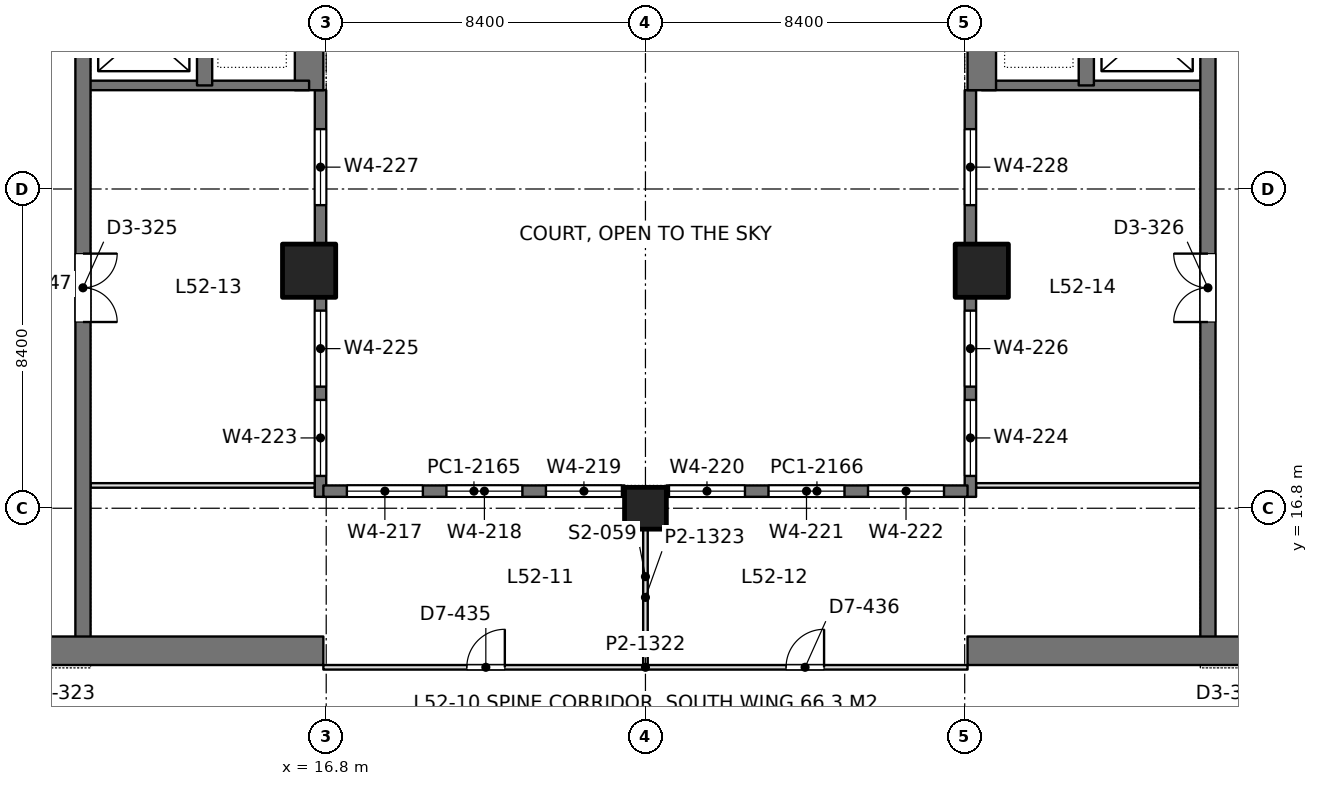
"""IFC4 building model, lengths in metres.
Left out: names, types, materials, properties, quantities, classifications, styles, units other than length and angle.
Written with IfcOpenShell. Run it as: python <this file> out.ifc"""

import sys

from ifc_helpers import new_model, si_unit, direction, frame, frame_2d, origin, origin_2d, place, context, subcontext, project, spatial, rectangle, extrude, element, fill, save


model = new_model("IFC4")
c1 = context("Model", 3, precision=1e-05, world=origin(), true_north=direction((0.0, 1.0)))
c2 = subcontext(c1, "Body", "Model", "MODEL_VIEW")
j1 = project(units=[si_unit("LENGTHUNIT", "METRE"), si_unit("PLANEANGLEUNIT", "RADIAN")], contexts=[c1])
p1 = place(None, origin())
s1 = spatial("IfcSite", under=j1, at=p1, CompositionType="ELEMENT")
p2 = place(p1, origin())
s2 = spatial("IfcBuilding", under=s1, at=p2, CompositionType="ELEMENT")
p3 = place(p2, frame((0.0, 0.0, 228.0)))
s3 = spatial("IfcBuildingStorey", under=s2, at=p3, CompositionType="ELEMENT", Elevation=228.0)
p4 = place(p3, frame((25.2, 16.8, 0.0), z_axis=(0.0, 0.0, 1.0), x_axis=(1.0, 0.0, 0.0)))
e1 = element("IfcColumn", 1, at=p4, inside=s3, PredefinedType="COLUMN", context=c2, shape_type="SweptSolid", body=[
    extrude(rectangle(XDim=1.1, YDim=1.1, at=origin_2d()), origin(), (0.0, 0.0, 1.0), 4.2),
])
for number, where, z_axis, x_axis in (
    (2, (16.35, 23.05, 0.0), (0.0, 0.0, 1.0), (1.0, 0.0, 0.0)),
    (3, (34.05, 23.05, 0.0), (0.0, 0.0, 1.0), (1.0, 0.0, 0.0)),
):
    element("IfcColumn", number, at=place(p3, frame(where, z_axis=z_axis, x_axis=x_axis)), inside=s3, PredefinedType="COLUMN", context=c2, shape_type="SweptSolid", body=[
        extrude(rectangle(XDim=1.4, YDim=1.4, at=origin_2d()), origin(), (0.0, 0.0, 1.0), 4.2),
    ])
p5 = place(p3, frame((-1.125, 13.05, 0.0), z_axis=(0.0, 0.0, 1.0), x_axis=(1.0, 0.0, 0.0)))
e4 = element("IfcWall", 4, at=p5, inside=s3, PredefinedType="SHEAR", context=c2, shape_type="SweptSolid", body=[
    extrude(rectangle(XDim=17.85, YDim=0.75, at=frame_2d((8.925, 0.0))), origin(), (0.0, 0.0, 1.0), 4.2),
])
p6 = place(p5, frame((8.875, 0.0, 0.0)))
e5 = element("IfcOpeningElement", 5, at=p6, cuts=e4, PredefinedType="OPENING", context=c2, shape_type="SweptSolid", body=[
    extrude(rectangle(XDim=1.8, YDim=2.4, at=frame_2d((0.9, 1.2))), frame((0.0, 0.385, 0.0), z_axis=(0.0, -1.0, 0.0), x_axis=(1.0, 0.0, 0.0)), (0.0, 0.0, 1.0), 0.77),
])
p7 = place(p3, frame((16.35, 27.8, 0.0), z_axis=(0.0, 0.0, 1.0), x_axis=(0.0, 1.0, 0.0)))
e6 = element("IfcWall", 6, at=p7, inside=s3, PredefinedType="SHEAR", context=c2, shape_type="SweptSolid", body=[
    extrude(rectangle(XDim=9.55, YDim=0.75, at=frame_2d((4.775, 0.0))), origin(), (0.0, 0.0, 1.0), 4.2),
])
p8 = place(p3, frame((10.4, 13.05, 0.0), z_axis=(0.0, 0.0, 1.0), x_axis=(0.0, 1.0, 0.0)))
e7 = element("IfcWall", 7, at=p8, inside=s3, PredefinedType="SHEAR", context=c2, shape_type="SweptSolid", body=[
    extrude(rectangle(XDim=24.3, YDim=0.4, at=frame_2d((12.15, 0.0))), origin(), (0.0, 0.0, 1.0), 4.2),
])
p9 = place(p8, frame((15.75, 0.0, 0.0)))
e8 = element("IfcOpeningElement", 8, at=p9, cuts=e7, PredefinedType="OPENING", context=c2, shape_type="SweptSolid", body=[
    extrude(rectangle(XDim=1.1, YDim=2.2, at=frame_2d((0.55, 1.1))), frame((0.0, 0.21, 0.0), z_axis=(0.0, -1.0, 0.0), x_axis=(1.0, 0.0, 0.0)), (0.0, 0.0, 1.0), 0.42),
])
p10 = place(p8, frame((18.6, 0.0, 0.0)))
e9 = element("IfcOpeningElement", 9, at=p10, cuts=e7, PredefinedType="OPENING", context=c2, shape_type="SweptSolid", body=[
    extrude(rectangle(XDim=1.1, YDim=2.2, at=frame_2d((0.55, 1.1))), frame((0.0, 0.21, 0.0), z_axis=(0.0, -1.0, 0.0), x_axis=(1.0, 0.0, 0.0)), (0.0, 0.0, 1.0), 0.42),
])
p11 = place(p8, frame((21.45, 0.0, 0.0)))
e10 = element("IfcOpeningElement", 10, at=p11, cuts=e7, PredefinedType="OPENING", context=c2, shape_type="SweptSolid", body=[
    extrude(rectangle(XDim=1.1, YDim=2.2, at=frame_2d((0.55, 1.1))), frame((0.0, 0.21, 0.0), z_axis=(0.0, -1.0, 0.0), x_axis=(1.0, 0.0, 0.0)), (0.0, 0.0, 1.0), 0.42),
])
p12 = place(p8, frame((8.65, 0.0, 0.0)))
e11 = element("IfcOpeningElement", 11, at=p12, cuts=e7, PredefinedType="OPENING", context=c2, shape_type="SweptSolid", body=[
    extrude(rectangle(XDim=1.8, YDim=2.4, at=frame_2d((0.9, 1.2))), frame((0.0, 0.21, 0.0), z_axis=(0.0, -1.0, 0.0), x_axis=(1.0, 0.0, 0.0)), (0.0, 0.0, 1.0), 0.42),
])
p13 = place(p3, frame((13.6, 27.925, 0.0), z_axis=(0.0, 0.0, 1.0), x_axis=(0.0, 1.0, 0.0)))
e12 = element("IfcWall", 12, at=p13, inside=s3, PredefinedType="SHEAR", context=c2, shape_type="SweptSolid", body=[
    extrude(rectangle(XDim=9.425, YDim=0.4, at=frame_2d((4.712, 0.0))), origin(), (0.0, 0.0, 1.0), 4.2),
])
p14 = place(p3, frame((10.4, 27.925, 0.0), z_axis=(0.0, 0.0, 1.0), x_axis=(1.0, 0.0, 0.0)))
e13 = element("IfcWall", 13, at=p14, inside=s3, PredefinedType="SHEAR", context=c2, shape_type="SweptSolid", body=[
    extrude(rectangle(XDim=5.95, YDim=0.25, at=frame_2d((2.975, 0.0))), origin(), (0.0, 0.0, 1.0), 4.2),
])
p15 = place(p3, frame((33.675, 13.05, 0.0), z_axis=(0.0, 0.0, 1.0), x_axis=(1.0, 0.0, 0.0)))
e14 = element("IfcWall", 14, at=p15, inside=s3, PredefinedType="SHEAR", context=c2, shape_type="SweptSolid", body=[
    extrude(rectangle(XDim=17.85, YDim=0.75, at=frame_2d((8.925, 0.0))), origin(), (0.0, 0.0, 1.0), 4.2),
])
p16 = place(p15, frame((7.175, 0.0, 0.0)))
e15 = element("IfcOpeningElement", 15, at=p16, cuts=e14, PredefinedType="OPENING", context=c2, shape_type="SweptSolid", body=[
    extrude(rectangle(XDim=1.8, YDim=2.4, at=frame_2d((0.9, 1.2))), frame((0.0, 0.385, 0.0), z_axis=(0.0, -1.0, 0.0), x_axis=(1.0, 0.0, 0.0)), (0.0, 0.0, 1.0), 0.77),
])
p17 = place(p3, frame((34.05, 27.8, 0.0), z_axis=(0.0, 0.0, 1.0), x_axis=(0.0, 1.0, 0.0)))
e16 = element("IfcWall", 16, at=p17, inside=s3, PredefinedType="SHEAR", context=c2, shape_type="SweptSolid", body=[
    extrude(rectangle(XDim=9.55, YDim=0.75, at=frame_2d((4.775, 0.0))), origin(), (0.0, 0.0, 1.0), 4.2),
])
p18 = place(p3, frame((40.0, 13.05, 0.0), z_axis=(0.0, 0.0, 1.0), x_axis=(0.0, 1.0, 0.0)))
e17 = element("IfcWall", 17, at=p18, inside=s3, PredefinedType="SHEAR", context=c2, shape_type="SweptSolid", body=[
    extrude(rectangle(XDim=24.3, YDim=0.4, at=frame_2d((12.15, 0.0))), origin(), (0.0, 0.0, 1.0), 4.2),
])
p19 = place(p18, frame((15.75, 0.0, 0.0)))
e18 = element("IfcOpeningElement", 18, at=p19, cuts=e17, PredefinedType="OPENING", context=c2, shape_type="SweptSolid", body=[
    extrude(rectangle(XDim=1.1, YDim=2.2, at=frame_2d((0.55, 1.1))), frame((0.0, 0.21, 0.0), z_axis=(0.0, -1.0, 0.0), x_axis=(1.0, 0.0, 0.0)), (0.0, 0.0, 1.0), 0.42),
])
p20 = place(p18, frame((18.6, 0.0, 0.0)))
e19 = element("IfcOpeningElement", 19, at=p20, cuts=e17, PredefinedType="OPENING", context=c2, shape_type="SweptSolid", body=[
    extrude(rectangle(XDim=1.1, YDim=2.2, at=frame_2d((0.55, 1.1))), frame((0.0, 0.21, 0.0), z_axis=(0.0, -1.0, 0.0), x_axis=(1.0, 0.0, 0.0)), (0.0, 0.0, 1.0), 0.42),
])
p21 = place(p18, frame((21.45, 0.0, 0.0)))
e20 = element("IfcOpeningElement", 20, at=p21, cuts=e17, PredefinedType="OPENING", context=c2, shape_type="SweptSolid", body=[
    extrude(rectangle(XDim=1.1, YDim=2.2, at=frame_2d((0.55, 1.1))), frame((0.0, 0.21, 0.0), z_axis=(0.0, -1.0, 0.0), x_axis=(1.0, 0.0, 0.0)), (0.0, 0.0, 1.0), 0.42),
])
p22 = place(p18, frame((8.65, 0.0, 0.0)))
e21 = element("IfcOpeningElement", 21, at=p22, cuts=e17, PredefinedType="OPENING", context=c2, shape_type="SweptSolid", body=[
    extrude(rectangle(XDim=1.8, YDim=2.4, at=frame_2d((0.9, 1.2))), frame((0.0, 0.21, 0.0), z_axis=(0.0, -1.0, 0.0), x_axis=(1.0, 0.0, 0.0)), (0.0, 0.0, 1.0), 0.42),
])
p23 = place(p3, frame((36.8, 27.925, 0.0), z_axis=(0.0, 0.0, 1.0), x_axis=(0.0, 1.0, 0.0)))
e22 = element("IfcWall", 22, at=p23, inside=s3, PredefinedType="SHEAR", context=c2, shape_type="SweptSolid", body=[
    extrude(rectangle(XDim=9.425, YDim=0.4, at=frame_2d((4.712, 0.0))), origin(), (0.0, 0.0, 1.0), 4.2),
])
p24 = place(p3, frame((40.0, 27.925, 0.0), z_axis=(0.0, 0.0, 1.0), x_axis=(-1.0, 0.0, 0.0)))
e23 = element("IfcWall", 23, at=p24, inside=s3, PredefinedType="SHEAR", context=c2, shape_type="SweptSolid", body=[
    extrude(rectangle(XDim=5.95, YDim=0.25, at=frame_2d((2.975, 0.0))), origin(), (0.0, 0.0, 1.0), 4.2),
])
p25 = place(p3, frame((16.65, 17.1, 0.0), z_axis=(0.0, 0.0, 1.0), x_axis=(0.0, 1.0, 0.0)))
e24 = element("IfcWall", 24, at=p25, inside=s3, PredefinedType="SOLIDWALL", context=c2, shape_type="SweptSolid", body=[
    extrude(rectangle(XDim=10.7, YDim=0.3, at=frame_2d((5.35, 0.0))), origin(), (0.0, 0.0, 1.0), 4.05),
])
p26 = place(p25, frame((0.55, 0.0, 0.9)))
e25 = element("IfcOpeningElement", 25, at=p26, cuts=e24, PredefinedType="OPENING", context=c2, shape_type="SweptSolid", body=[
    extrude(rectangle(XDim=2.0, YDim=1.9, at=frame_2d((1.0, 0.95))), frame((0.0, 0.16, 0.0), z_axis=(0.0, -1.0, 0.0), x_axis=(1.0, 0.0, 0.0)), (0.0, 0.0, 1.0), 0.32),
])
p27 = place(p25, frame((2.9, 0.0, 0.9)))
e26 = element("IfcOpeningElement", 26, at=p27, cuts=e24, PredefinedType="OPENING", context=c2, shape_type="SweptSolid", body=[
    extrude(rectangle(XDim=2.0, YDim=1.9, at=frame_2d((1.0, 0.95))), frame((0.0, 0.16, 0.0), z_axis=(0.0, -1.0, 0.0), x_axis=(1.0, 0.0, 0.0)), (0.0, 0.0, 1.0), 0.32),
])
p28 = place(p25, frame((7.675, 0.0, 0.9)))
e27 = element("IfcOpeningElement", 27, at=p28, cuts=e24, PredefinedType="OPENING", context=c2, shape_type="SweptSolid", body=[
    extrude(rectangle(XDim=2.0, YDim=1.9, at=frame_2d((1.0, 0.95))), frame((0.0, 0.16, 0.0), z_axis=(0.0, -1.0, 0.0), x_axis=(1.0, 0.0, 0.0)), (0.0, 0.0, 1.0), 0.32),
])
p29 = place(p3, frame((33.75, 17.1, 0.0), z_axis=(0.0, 0.0, 1.0), x_axis=(0.0, 1.0, 0.0)))
e28 = element("IfcWall", 28, at=p29, inside=s3, PredefinedType="SOLIDWALL", context=c2, shape_type="SweptSolid", body=[
    extrude(rectangle(XDim=10.7, YDim=0.3, at=frame_2d((5.35, 0.0))), origin(), (0.0, 0.0, 1.0), 4.05),
])
p30 = place(p29, frame((0.55, 0.0, 0.9)))
e29 = element("IfcOpeningElement", 29, at=p30, cuts=e28, PredefinedType="OPENING", context=c2, shape_type="SweptSolid", body=[
    extrude(rectangle(XDim=2.0, YDim=1.9, at=frame_2d((1.0, 0.95))), frame((0.0, 0.16, 0.0), z_axis=(0.0, -1.0, 0.0), x_axis=(1.0, 0.0, 0.0)), (0.0, 0.0, 1.0), 0.32),
])
p31 = place(p29, frame((2.9, 0.0, 0.9)))
e30 = element("IfcOpeningElement", 30, at=p31, cuts=e28, PredefinedType="OPENING", context=c2, shape_type="SweptSolid", body=[
    extrude(rectangle(XDim=2.0, YDim=1.9, at=frame_2d((1.0, 0.95))), frame((0.0, 0.16, 0.0), z_axis=(0.0, -1.0, 0.0), x_axis=(1.0, 0.0, 0.0)), (0.0, 0.0, 1.0), 0.32),
])
p32 = place(p29, frame((7.675, 0.0, 0.9)))
e31 = element("IfcOpeningElement", 31, at=p32, cuts=e28, PredefinedType="OPENING", context=c2, shape_type="SweptSolid", body=[
    extrude(rectangle(XDim=2.0, YDim=1.9, at=frame_2d((1.0, 0.95))), frame((0.0, 0.16, 0.0), z_axis=(0.0, -1.0, 0.0), x_axis=(1.0, 0.0, 0.0)), (0.0, 0.0, 1.0), 0.32),
])
p33 = place(p3, frame((16.725, 17.25, 0.0), z_axis=(0.0, 0.0, 1.0), x_axis=(1.0, 0.0, 0.0)))
e32 = element("IfcWall", 32, at=p33, inside=s3, PredefinedType="SOLIDWALL", context=c2, shape_type="SweptSolid", body=[
    extrude(rectangle(XDim=7.925, YDim=0.3, at=frame_2d((3.962, 0.0))), origin(), (0.0, 0.0, 1.0), 4.05),
])
p34 = place(p33, frame((0.619, 0.0, 0.9)))
e33 = element("IfcOpeningElement", 33, at=p34, cuts=e32, PredefinedType="OPENING", context=c2, shape_type="SweptSolid", body=[
    extrude(rectangle(XDim=2.0, YDim=1.9, at=frame_2d((1.0, 0.95))), frame((0.0, 0.16, 0.0), z_axis=(0.0, -1.0, 0.0), x_axis=(1.0, 0.0, 0.0)), (0.0, 0.0, 1.0), 0.32),
])
p35 = place(p33, frame((3.238, 0.0, 0.9)))
e34 = element("IfcOpeningElement", 34, at=p35, cuts=e32, PredefinedType="OPENING", context=c2, shape_type="SweptSolid", body=[
    extrude(rectangle(XDim=2.0, YDim=1.9, at=frame_2d((1.0, 0.95))), frame((0.0, 0.16, 0.0), z_axis=(0.0, -1.0, 0.0), x_axis=(1.0, 0.0, 0.0)), (0.0, 0.0, 1.0), 0.32),
])
p36 = place(p33, frame((5.856, 0.0, 0.9)))
e35 = element("IfcOpeningElement", 35, at=p36, cuts=e32, PredefinedType="OPENING", context=c2, shape_type="SweptSolid", body=[
    extrude(rectangle(XDim=2.0, YDim=1.9, at=frame_2d((1.0, 0.95))), frame((0.0, 0.16, 0.0), z_axis=(0.0, -1.0, 0.0), x_axis=(1.0, 0.0, 0.0)), (0.0, 0.0, 1.0), 0.32),
])
p37 = place(p3, frame((25.75, 17.25, 0.0), z_axis=(0.0, 0.0, 1.0), x_axis=(1.0, 0.0, 0.0)))
e36 = element("IfcWall", 36, at=p37, inside=s3, PredefinedType="SOLIDWALL", context=c2, shape_type="SweptSolid", body=[
    extrude(rectangle(XDim=7.925, YDim=0.3, at=frame_2d((3.962, 0.0))), origin(), (0.0, 0.0, 1.0), 4.05),
])
p38 = place(p37, frame((0.069, 0.0, 0.9)))
e37 = element("IfcOpeningElement", 37, at=p38, cuts=e36, PredefinedType="OPENING", context=c2, shape_type="SweptSolid", body=[
    extrude(rectangle(XDim=2.0, YDim=1.9, at=frame_2d((1.0, 0.95))), frame((0.0, 0.16, 0.0), z_axis=(0.0, -1.0, 0.0), x_axis=(1.0, 0.0, 0.0)), (0.0, 0.0, 1.0), 0.32),
])
p39 = place(p37, frame((2.688, 0.0, 0.9)))
e38 = element("IfcOpeningElement", 38, at=p39, cuts=e36, PredefinedType="OPENING", context=c2, shape_type="SweptSolid", body=[
    extrude(rectangle(XDim=2.0, YDim=1.9, at=frame_2d((1.0, 0.95))), frame((0.0, 0.16, 0.0), z_axis=(0.0, -1.0, 0.0), x_axis=(1.0, 0.0, 0.0)), (0.0, 0.0, 1.0), 0.32),
])
p40 = place(p37, frame((5.306, 0.0, 0.9)))
e39 = element("IfcOpeningElement", 39, at=p40, cuts=e36, PredefinedType="OPENING", context=c2, shape_type="SweptSolid", body=[
    extrude(rectangle(XDim=2.0, YDim=1.9, at=frame_2d((1.0, 0.95))), frame((0.0, 0.16, 0.0), z_axis=(0.0, -1.0, 0.0), x_axis=(1.0, 0.0, 0.0)), (0.0, 0.0, 1.0), 0.32),
])
for number, where, z_axis, x_axis in (
    (40, (10.598, 17.4, 0.0), (0.0, 0.0, 1.0), (1.0, 0.0, 0.0)),
    (41, (33.898, 17.4, 0.0), (0.0, 0.0, 1.0), (1.0, 0.0, 0.0)),
):
    element("IfcWall", number, at=place(p3, frame(where, z_axis=z_axis, x_axis=x_axis)), inside=s3, PredefinedType="PARTITIONING", context=c2, shape_type="SweptSolid", body=[
        extrude(rectangle(XDim=5.904, YDim=0.12, at=frame_2d((2.952, 0.0))), origin(), (0.0, 0.0, 1.0), 3.55),
    ])
p41 = place(p3, frame((25.2, 12.658, 0.0), z_axis=(0.0, 0.0, 1.0), x_axis=(0.0, 1.0, 0.0)))
e42 = element("IfcWall", 42, at=p41, inside=s3, PredefinedType="PARTITIONING", context=c2, shape_type="SweptSolid", body=[
    extrude(rectangle(XDim=3.593, YDim=0.12, at=frame_2d((1.796, 0.0))), origin(), (0.0, 0.0, 1.0), 3.55),
])
p42 = place(p3, frame((16.725, 12.615, 0.0), z_axis=(0.0, 0.0, 1.0), x_axis=(1.0, 0.0, 0.0)))
e43 = element("IfcWall", 43, at=p42, inside=s3, PredefinedType="PARTITIONING", context=c2, shape_type="SweptSolid", body=[
    extrude(rectangle(XDim=16.95, YDim=0.12, at=frame_2d((8.475, 0.0))), origin(), (0.0, 0.0, 1.0), 3.55),
])
p43 = place(p42, frame((3.775, 0.0, 0.0)))
e44 = element("IfcOpeningElement", 44, at=p43, cuts=e43, PredefinedType="OPENING", context=c2, shape_type="SweptSolid", body=[
    extrude(rectangle(XDim=1.0, YDim=2.4, at=frame_2d((0.5, 1.2))), frame((0.0, 0.07, 0.0), z_axis=(0.0, -1.0, 0.0), x_axis=(1.0, 0.0, 0.0)), (0.0, 0.0, 1.0), 0.14),
])
p44 = place(p42, frame((12.175, 0.0, 0.0)))
e45 = element("IfcOpeningElement", 45, at=p44, cuts=e43, PredefinedType="OPENING", context=c2, shape_type="SweptSolid", body=[
    extrude(rectangle(XDim=1.0, YDim=2.4, at=frame_2d((0.5, 1.2))), frame((0.0, 0.07, 0.0), z_axis=(0.0, -1.0, 0.0), x_axis=(1.0, 0.0, 0.0)), (0.0, 0.0, 1.0), 0.14),
])
p45 = place(p26, origin())
e46 = element("IfcWindow", 46, at=p45, inside=s3, PartitioningType="SINGLE_PANEL", PredefinedType="WINDOW", context=c2, shape_type="SweptSolid", body=[
    extrude(rectangle(XDim=2.0, YDim=1.9, at=frame_2d((1.0, 0.95))), frame((0.0, 0.03, 0.0), z_axis=(0.0, -1.0, 0.0), x_axis=(1.0, 0.0, 0.0)), (0.0, 0.0, 1.0), 0.06),
])
fill(e25, e46)
p46 = place(p27, origin())
e47 = element("IfcWindow", 47, at=p46, inside=s3, PartitioningType="SINGLE_PANEL", PredefinedType="WINDOW", context=c2, shape_type="SweptSolid", body=[
    extrude(rectangle(XDim=2.0, YDim=1.9, at=frame_2d((1.0, 0.95))), frame((0.0, 0.03, 0.0), z_axis=(0.0, -1.0, 0.0), x_axis=(1.0, 0.0, 0.0)), (0.0, 0.0, 1.0), 0.06),
])
fill(e26, e47)
p47 = place(p28, origin())
e48 = element("IfcWindow", 48, at=p47, inside=s3, PartitioningType="SINGLE_PANEL", PredefinedType="WINDOW", context=c2, shape_type="SweptSolid", body=[
    extrude(rectangle(XDim=2.0, YDim=1.9, at=frame_2d((1.0, 0.95))), frame((0.0, 0.03, 0.0), z_axis=(0.0, -1.0, 0.0), x_axis=(1.0, 0.0, 0.0)), (0.0, 0.0, 1.0), 0.06),
])
fill(e27, e48)
p48 = place(p30, origin())
e49 = element("IfcWindow", 49, at=p48, inside=s3, PartitioningType="SINGLE_PANEL", PredefinedType="WINDOW", context=c2, shape_type="SweptSolid", body=[
    extrude(rectangle(XDim=2.0, YDim=1.9, at=frame_2d((1.0, 0.95))), frame((0.0, 0.03, 0.0), z_axis=(0.0, -1.0, 0.0), x_axis=(1.0, 0.0, 0.0)), (0.0, 0.0, 1.0), 0.06),
])
fill(e29, e49)
p49 = place(p31, origin())
e50 = element("IfcWindow", 50, at=p49, inside=s3, PartitioningType="SINGLE_PANEL", PredefinedType="WINDOW", context=c2, shape_type="SweptSolid", body=[
    extrude(rectangle(XDim=2.0, YDim=1.9, at=frame_2d((1.0, 0.95))), frame((0.0, 0.03, 0.0), z_axis=(0.0, -1.0, 0.0), x_axis=(1.0, 0.0, 0.0)), (0.0, 0.0, 1.0), 0.06),
])
fill(e30, e50)
p50 = place(p32, origin())
e51 = element("IfcWindow", 51, at=p50, inside=s3, PartitioningType="SINGLE_PANEL", PredefinedType="WINDOW", context=c2, shape_type="SweptSolid", body=[
    extrude(rectangle(XDim=2.0, YDim=1.9, at=frame_2d((1.0, 0.95))), frame((0.0, 0.03, 0.0), z_axis=(0.0, -1.0, 0.0), x_axis=(1.0, 0.0, 0.0)), (0.0, 0.0, 1.0), 0.06),
])
fill(e31, e51)
p51 = place(p34, origin())
e52 = element("IfcWindow", 52, at=p51, inside=s3, PartitioningType="SINGLE_PANEL", PredefinedType="WINDOW", context=c2, shape_type="SweptSolid", body=[
    extrude(rectangle(XDim=2.0, YDim=1.9, at=frame_2d((1.0, 0.95))), frame((0.0, 0.03, 0.0), z_axis=(0.0, -1.0, 0.0), x_axis=(1.0, 0.0, 0.0)), (0.0, 0.0, 1.0), 0.06),
])
fill(e33, e52)
p52 = place(p35, origin())
e53 = element("IfcWindow", 53, at=p52, inside=s3, PartitioningType="SINGLE_PANEL", PredefinedType="WINDOW", context=c2, shape_type="SweptSolid", body=[
    extrude(rectangle(XDim=2.0, YDim=1.9, at=frame_2d((1.0, 0.95))), frame((0.0, 0.03, 0.0), z_axis=(0.0, -1.0, 0.0), x_axis=(1.0, 0.0, 0.0)), (0.0, 0.0, 1.0), 0.06),
])
fill(e34, e53)
p53 = place(p36, origin())
e54 = element("IfcWindow", 54, at=p53, inside=s3, PartitioningType="SINGLE_PANEL", PredefinedType="WINDOW", context=c2, shape_type="SweptSolid", body=[
    extrude(rectangle(XDim=2.0, YDim=1.9, at=frame_2d((1.0, 0.95))), frame((0.0, 0.03, 0.0), z_axis=(0.0, -1.0, 0.0), x_axis=(1.0, 0.0, 0.0)), (0.0, 0.0, 1.0), 0.06),
])
fill(e35, e54)
p54 = place(p38, origin())
e55 = element("IfcWindow", 55, at=p54, inside=s3, PartitioningType="SINGLE_PANEL", PredefinedType="WINDOW", context=c2, shape_type="SweptSolid", body=[
    extrude(rectangle(XDim=2.0, YDim=1.9, at=frame_2d((1.0, 0.95))), frame((0.0, 0.03, 0.0), z_axis=(0.0, -1.0, 0.0), x_axis=(1.0, 0.0, 0.0)), (0.0, 0.0, 1.0), 0.06),
])
fill(e37, e55)
p55 = place(p39, origin())
e56 = element("IfcWindow", 56, at=p55, inside=s3, PartitioningType="SINGLE_PANEL", PredefinedType="WINDOW", context=c2, shape_type="SweptSolid", body=[
    extrude(rectangle(XDim=2.0, YDim=1.9, at=frame_2d((1.0, 0.95))), frame((0.0, 0.03, 0.0), z_axis=(0.0, -1.0, 0.0), x_axis=(1.0, 0.0, 0.0)), (0.0, 0.0, 1.0), 0.06),
])
fill(e38, e56)
p56 = place(p40, origin())
e57 = element("IfcWindow", 57, at=p56, inside=s3, PartitioningType="SINGLE_PANEL", PredefinedType="WINDOW", context=c2, shape_type="SweptSolid", body=[
    extrude(rectangle(XDim=2.0, YDim=1.9, at=frame_2d((1.0, 0.95))), frame((0.0, 0.03, 0.0), z_axis=(0.0, -1.0, 0.0), x_axis=(1.0, 0.0, 0.0)), (0.0, 0.0, 1.0), 0.06),
])
fill(e39, e57)
p57 = place(p12, frame((1.8, 0.0, 0.0), z_axis=(0.0, 0.0, 1.0), x_axis=(-1.0, 0.0, 0.0)))
e58 = element("IfcDoor", 58, at=p57, inside=s3, OperationType="DOUBLE_DOOR_SINGLE_SWING", PredefinedType="DOOR", context=c2, shape_type="SweptSolid", body=[
    extrude(rectangle(XDim=1.8, YDim=2.4, at=frame_2d((0.9, 1.2))), frame((0.0, 0.025, 0.0), z_axis=(0.0, -1.0, 0.0), x_axis=(1.0, 0.0, 0.0)), (0.0, 0.0, 1.0), 0.05),
])
fill(e11, e58)
p58 = place(p22, origin())
e59 = element("IfcDoor", 59, at=p58, inside=s3, OperationType="DOUBLE_DOOR_SINGLE_SWING", PredefinedType="DOOR", context=c2, shape_type="SweptSolid", body=[
    extrude(rectangle(XDim=1.8, YDim=2.4, at=frame_2d((0.9, 1.2))), frame((0.0, 0.025, 0.0), z_axis=(0.0, -1.0, 0.0), x_axis=(1.0, 0.0, 0.0)), (0.0, 0.0, 1.0), 0.05),
])
fill(e21, e59)
p59 = place(p43, origin())
e60 = element("IfcDoor", 60, at=p59, inside=s3, OperationType="SINGLE_SWING_RIGHT", PredefinedType="DOOR", context=c2, shape_type="SweptSolid", body=[
    extrude(rectangle(XDim=1.0, YDim=2.4, at=frame_2d((0.5, 1.2))), frame((0.0, 0.025, 0.0), z_axis=(0.0, -1.0, 0.0), x_axis=(1.0, 0.0, 0.0)), (0.0, 0.0, 1.0), 0.05),
])
fill(e44, e60)
p60 = place(p44, origin())
e61 = element("IfcDoor", 61, at=p60, inside=s3, OperationType="SINGLE_SWING_RIGHT", PredefinedType="DOOR", context=c2, shape_type="SweptSolid", body=[
    extrude(rectangle(XDim=1.0, YDim=2.4, at=frame_2d((0.5, 1.2))), frame((0.0, 0.025, 0.0), z_axis=(0.0, -1.0, 0.0), x_axis=(1.0, 0.0, 0.0)), (0.0, 0.0, 1.0), 0.05),
])
fill(e45, e61)
save(model, sys.argv[1])
